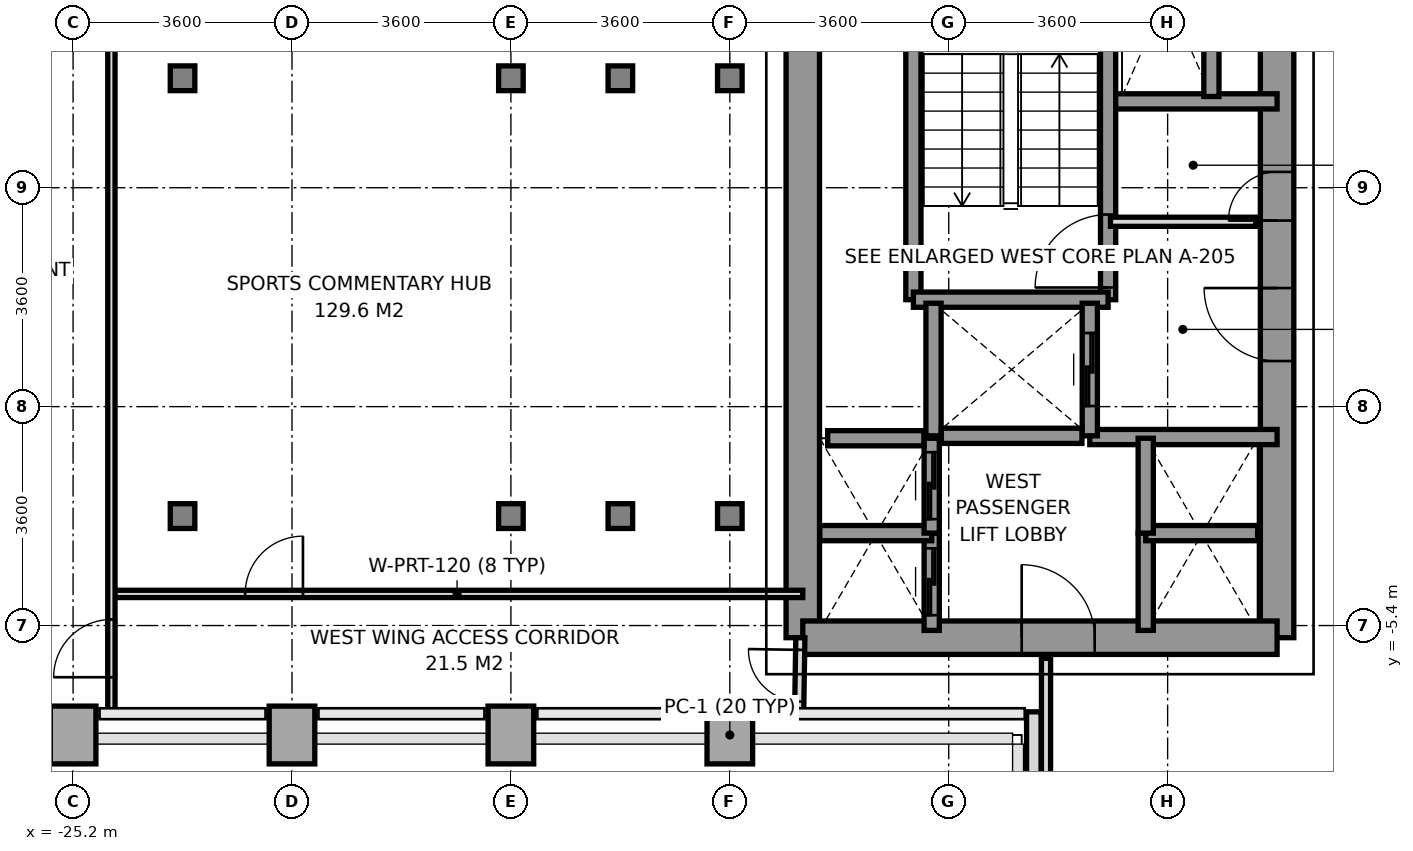
"""IFC4 building model, lengths in metres.
Left out: names, types, materials, properties, quantities, classifications, styles, units other than length and angle.
Written with IfcOpenShell. Run it as: python <this file> out.ifc"""

import sys

from ifc_helpers import new_model, si_unit, direction, frame, frame_2d, origin, origin_2d, place, context, subcontext, project, spatial, rectangle, i_section, extrude, source, transform, mapped, element, fill, save


model = new_model("IFC4")
c1 = context("Model", 3, precision=1e-05, world=origin(), true_north=direction((0.0, 1.0)))
c2 = subcontext(c1, "Body", "Model", "MODEL_VIEW")
j1 = project(units=[si_unit("LENGTHUNIT", "METRE"), si_unit("PLANEANGLEUNIT", "RADIAN")], contexts=[c1])
p1 = place(None, origin())
s1 = spatial("IfcSite", under=j1, at=p1, CompositionType="ELEMENT")
p2 = place(p1, origin())
s2 = spatial("IfcBuilding", under=s1, at=p2, CompositionType="ELEMENT")
p3 = place(p2, frame((0.0, 0.0, 78.2)))
s3 = spatial("IfcBuildingStorey", under=s2, at=p3, CompositionType="ELEMENT", Elevation=78.2)
m1 = source(origin(), c2, "Body", "SweptSolid", [
    extrude(rectangle(XDim=0.75, YDim=0.95, at=origin_2d()), origin(), (0.0, 0.0, 1.0), 3.2),
])
p4 = place(p3, frame((-25.2, -7.2, 0.0), z_axis=(0.0, 0.0, 1.0), x_axis=(1.0, 0.0, 0.0)))
e1 = element("IfcColumn", 1, at=p4, inside=s3, PredefinedType="COLUMN", context=c2, shape_type="MappedRepresentation", body=[
    mapped(m1, transform((0.0, 0.0, 0.0), x_axis=(1.0, 0.0, 0.0), y_axis=(0.0, 1.0, 0.0), z_axis=(0.0, 0.0, 1.0), scale=1.0)),
])
m2 = source(origin(), c2, "Body", "SweptSolid", [
    extrude(i_section(OverallWidth=0.404, OverallDepth=0.407, WebThickness=0.022, FlangeThickness=0.035, at=origin_2d()), origin(), (0.0, 0.0, 1.0), 3.2),
])
for number, where, z_axis, x_axis in (
    (2, (-23.4, -3.6, 0.0), (0.0, 0.0, 1.0), (1.0, 0.0, 0.0)),
    (3, (-23.4, 3.6, 0.0), (0.0, 0.0, 1.0), (1.0, 0.0, 0.0)),
):
    element("IfcColumn", number, at=place(p3, frame(where, z_axis=z_axis, x_axis=x_axis)), inside=s3, PredefinedType="COLUMN", context=c2, shape_type="MappedRepresentation", body=[
        mapped(m2, transform((0.0, 0.0, 0.0), x_axis=(1.0, 0.0, 0.0), y_axis=(0.0, 1.0, 0.0), z_axis=(0.0, 0.0, 1.0), scale=1.0)),
    ])
for number, where, z_axis, x_axis in (
    (4, (-21.6, -7.2, 0.0), (0.0, 0.0, 1.0), (1.0, 0.0, 0.0)),
    (5, (-18.0, -7.2, 0.0), (0.0, 0.0, 1.0), (1.0, 0.0, 0.0)),
):
    element("IfcColumn", number, at=place(p3, frame(where, z_axis=z_axis, x_axis=x_axis)), inside=s3, PredefinedType="COLUMN", context=c2, shape_type="MappedRepresentation", body=[
        mapped(m1, transform((0.0, 0.0, 0.0), x_axis=(1.0, 0.0, 0.0), y_axis=(0.0, 1.0, 0.0), z_axis=(0.0, 0.0, 1.0), scale=1.0)),
    ])
for number, where, z_axis, x_axis in (
    (6, (-18.0, -3.6, 0.0), (0.0, 0.0, 1.0), (1.0, 0.0, 0.0)),
    (7, (-18.0, 3.6, 0.0), (0.0, 0.0, 1.0), (1.0, 0.0, 0.0)),
    (8, (-16.2, -3.6, 0.0), (0.0, 0.0, 1.0), (1.0, 0.0, 0.0)),
    (9, (-16.2, 3.6, 0.0), (0.0, 0.0, 1.0), (1.0, 0.0, 0.0)),
):
    element("IfcColumn", number, at=place(p3, frame(where, z_axis=z_axis, x_axis=x_axis)), inside=s3, PredefinedType="COLUMN", context=c2, shape_type="MappedRepresentation", body=[
        mapped(m2, transform((0.0, 0.0, 0.0), x_axis=(1.0, 0.0, 0.0), y_axis=(0.0, 1.0, 0.0), z_axis=(0.0, 0.0, 1.0), scale=1.0)),
    ])
p5 = place(p3, frame((-14.4, -7.2, 0.0), z_axis=(0.0, 0.0, 1.0), x_axis=(1.0, 0.0, 0.0)))
e10 = element("IfcColumn", 10, at=p5, inside=s3, PredefinedType="COLUMN", context=c2, shape_type="MappedRepresentation", body=[
    mapped(m1, transform((0.0, 0.0, 0.0), x_axis=(1.0, 0.0, 0.0), y_axis=(0.0, 1.0, 0.0), z_axis=(0.0, 0.0, 1.0), scale=1.0)),
])
for number, where, z_axis, x_axis in (
    (11, (-14.4, -3.6, 0.0), (0.0, 0.0, 1.0), (1.0, 0.0, 0.0)),
    (12, (-14.4, 3.6, 0.0), (0.0, 0.0, 1.0), (1.0, 0.0, 0.0)),
):
    element("IfcColumn", number, at=place(p3, frame(where, z_axis=z_axis, x_axis=x_axis)), inside=s3, PredefinedType="COLUMN", context=c2, shape_type="MappedRepresentation", body=[
        mapped(m2, transform((0.0, 0.0, 0.0), x_axis=(1.0, 0.0, 0.0), y_axis=(0.0, 1.0, 0.0), z_axis=(0.0, 0.0, 1.0), scale=1.0)),
    ])
p6 = place(p3, frame((-9.4, -8.397, 0.0), z_axis=(0.0, 0.0, 1.0), x_axis=(0.0, 1.0, 0.0)))
e13 = element("IfcWall", 13, at=p6, inside=s3, PredefinedType="PARAPET", context=c2, shape_type="SweptSolid", body=[
    extrude(rectangle(XDim=1.578, YDim=0.24, at=frame_2d((0.789, 0.0))), origin(), (0.0, 0.0, 1.0), 1.15),
])
p7 = place(p3, frame((-13.2, -5.6, 0.0), z_axis=(0.0, 0.0, 1.0), x_axis=(0.0, 1.0, 0.0)))
e14 = element("IfcWall", 14, at=p7, inside=s3, PredefinedType="SHEAR", context=c2, shape_type="SweptSolid", body=[
    extrude(rectangle(XDim=11.2, YDim=0.55, at=frame_2d((5.6, 0.0))), origin(), (0.0, 0.0, 1.0), 3.2),
])
p8 = place(p3, frame((-5.4, -5.6, 0.0), z_axis=(0.0, 0.0, 1.0), x_axis=(0.0, 1.0, 0.0)))
e15 = element("IfcWall", 15, at=p8, inside=s3, PredefinedType="SHEAR", context=c2, shape_type="SweptSolid", body=[
    extrude(rectangle(XDim=12.5, YDim=0.55, at=frame_2d((6.25, 0.0))), origin(), (0.0, 0.0, 1.0), 3.2),
])
p9 = place(p8, frame((4.55, 0.0, 0.0)))
e16 = element("IfcOpeningElement", 16, at=p9, cuts=e15, PredefinedType="OPENING", context=c2, shape_type="SweptSolid", body=[
    extrude(rectangle(XDim=1.2, YDim=2.2, at=frame_2d((0.6, 1.1))), frame((0.0, 0.285, 0.0), z_axis=(0.0, -1.0, 0.0), x_axis=(1.0, 0.0, 0.0)), (0.0, 0.0, 1.0), 0.57),
])
p10 = place(p8, frame((6.86, 0.0, 0.0)))
e17 = element("IfcOpeningElement", 17, at=p10, cuts=e15, PredefinedType="OPENING", context=c2, shape_type="SweptSolid", body=[
    extrude(rectangle(XDim=0.8, YDim=2.1, at=frame_2d((0.4, 1.05))), frame((0.0, 0.285, 0.0), z_axis=(0.0, -1.0, 0.0), x_axis=(1.0, 0.0, 0.0)), (0.0, 0.0, 1.0), 0.57),
])
p11 = place(p3, frame((-13.2, -5.6, 0.0), z_axis=(0.0, 0.0, 1.0), x_axis=(1.0, 0.0, 0.0)))
e18 = element("IfcWall", 18, at=p11, inside=s3, PredefinedType="SHEAR", context=c2, shape_type="SweptSolid", body=[
    extrude(rectangle(XDim=7.8, YDim=0.55, at=frame_2d((3.9, 0.0))), origin(), (0.0, 0.0, 1.0), 3.2),
])
p12 = place(p11, frame((3.6, 0.0, 0.0)))
e19 = element("IfcOpeningElement", 19, at=p12, cuts=e18, PredefinedType="OPENING", context=c2, shape_type="SweptSolid", body=[
    extrude(rectangle(XDim=1.2, YDim=2.2, at=frame_2d((0.6, 1.1))), frame((0.0, 0.285, 0.0), z_axis=(0.0, -1.0, 0.0), x_axis=(1.0, 0.0, 0.0)), (0.0, 0.0, 1.0), 0.57),
])
p13 = place(p3, frame((-8.18, 3.22, 0.0), z_axis=(0.0, 0.0, 1.0), x_axis=(1.0, 0.0, 0.0)))
e20 = element("IfcWall", 20, at=p13, inside=s3, PredefinedType="SOLIDWALL", context=c2, shape_type="SweptSolid", body=[
    extrude(rectangle(XDim=2.78, YDim=0.25, at=frame_2d((1.39, 0.0))), origin(), (0.0, 0.0, 1.0), 3.2),
])
p14 = place(p3, frame((-8.48, -2.3, 0.0), z_axis=(0.0, 0.0, 1.0), x_axis=(1.0, 0.0, 0.0)))
e21 = element("IfcWall", 21, at=p14, inside=s3, PredefinedType="SOLIDWALL", context=c2, shape_type="SweptSolid", body=[
    extrude(rectangle(XDim=3.08, YDim=0.25, at=frame_2d((1.54, 0.0))), origin(), (0.0, 0.0, 1.0), 3.2),
])
p15 = place(p3, frame((-8.179, -0.041, 0.0), z_axis=(0.0, 0.0, 1.0), x_axis=(0.0, 1.0, 0.0)))
e22 = element("IfcWall", 22, at=p15, inside=s3, PredefinedType="SOLIDWALL", context=c2, shape_type="SweptSolid", body=[
    extrude(rectangle(XDim=6.941, YDim=0.25, at=frame_2d((3.47, 0.0))), origin(), (0.0, 0.0, 1.0), 3.2),
])
p16 = place(p15, frame((0.2, 0.0, 0.0)))
e23 = element("IfcOpeningElement", 23, at=p16, cuts=e22, PredefinedType="OPENING", context=c2, shape_type="SweptSolid", body=[
    extrude(rectangle(XDim=1.2, YDim=2.2, at=frame_2d((0.6, 1.1))), frame((0.0, 0.135, 0.0), z_axis=(0.0, -1.0, 0.0), x_axis=(1.0, 0.0, 0.0)), (0.0, 0.0, 1.0), 0.27),
])
p17 = place(p3, frame((-11.381, -0.041, 0.0), z_axis=(0.0, 0.0, 1.0), x_axis=(0.0, 1.0, 0.0)))
e24 = element("IfcWall", 24, at=p17, inside=s3, PredefinedType="SOLIDWALL", context=c2, shape_type="SweptSolid", body=[
    extrude(rectangle(XDim=6.941, YDim=0.25, at=frame_2d((3.47, 0.0))), origin(), (0.0, 0.0, 1.0), 3.2),
])
p18 = place(p3, frame((-11.381, -0.041, 0.0), z_axis=(0.0, 0.0, 1.0), x_axis=(1.0, 0.0, 0.0)))
e25 = element("IfcWall", 25, at=p18, inside=s3, PredefinedType="SOLIDWALL", context=c2, shape_type="SweptSolid", body=[
    extrude(rectangle(XDim=3.202, YDim=0.25, at=frame_2d((1.601, 0.0))), origin(), (0.0, 0.0, 1.0), 3.2),
])
p19 = place(p3, frame((-11.05, -2.28, 0.0), z_axis=(0.0, 0.0, 1.0), x_axis=(0.0, 1.0, 0.0)))
e26 = element("IfcWall", 26, at=p19, inside=s3, PredefinedType="SOLIDWALL", context=c2, shape_type="SweptSolid", body=[
    extrude(rectangle(XDim=2.18, YDim=0.25, at=frame_2d((1.09, 0.0))), origin(), (0.0, 0.0, 1.0), 3.2),
])
p20 = place(p3, frame((-8.48, -2.28, 0.0), z_axis=(0.0, 0.0, 1.0), x_axis=(0.0, 1.0, 0.0)))
e27 = element("IfcWall", 27, at=p20, inside=s3, PredefinedType="SOLIDWALL", context=c2, shape_type="SweptSolid", body=[
    extrude(rectangle(XDim=2.18, YDim=0.25, at=frame_2d((1.09, 0.0))), origin(), (0.0, 0.0, 1.0), 3.2),
])
p21 = place(p20, frame((0.49, 0.0, 0.0)))
e28 = element("IfcOpeningElement", 28, at=p21, cuts=e27, PredefinedType="OPENING", context=c2, shape_type="SweptSolid", body=[
    extrude(rectangle(XDim=1.2, YDim=2.2, at=frame_2d((0.6, 1.1))), frame((0.0, 0.135, 0.0), z_axis=(0.0, -1.0, 0.0), x_axis=(1.0, 0.0, 0.0)), (0.0, 0.0, 1.0), 0.27),
])
p22 = place(p3, frame((-10.921, -2.28, 0.0), z_axis=(0.0, 0.0, 1.0), x_axis=(1.0, 0.0, 0.0)))
e29 = element("IfcWall", 29, at=p22, inside=s3, PredefinedType="SOLIDWALL", context=c2, shape_type="SweptSolid", body=[
    extrude(rectangle(XDim=2.312, YDim=0.25, at=frame_2d((1.156, 0.0))), origin(), (0.0, 0.0, 1.0), 3.2),
])
p23 = place(p3, frame((-11.08, -5.48, 0.0), z_axis=(0.0, 0.0, 1.0), x_axis=(0.0, 1.0, 0.0)))
e30 = element("IfcWall", 30, at=p23, inside=s3, PredefinedType="SOLIDWALL", context=c2, shape_type="SweptSolid", body=[
    extrude(rectangle(XDim=1.6, YDim=0.25, at=frame_2d((0.8, 0.0))), origin(), (0.0, 0.0, 1.0), 3.2),
])
p24 = place(p23, frame((0.25, 0.0, 0.0)))
e31 = element("IfcOpeningElement", 31, at=p24, cuts=e30, PredefinedType="OPENING", context=c2, shape_type="SweptSolid", body=[
    extrude(rectangle(XDim=1.1, YDim=2.2, at=frame_2d((0.55, 1.1))), frame((0.0, 0.135, 0.0), z_axis=(0.0, -1.0, 0.0), x_axis=(1.0, 0.0, 0.0)), (0.0, 0.0, 1.0), 0.27),
])
p25 = place(p3, frame((-12.92, -3.88, 0.0), z_axis=(0.0, 0.0, 1.0), x_axis=(1.0, 0.0, 0.0)))
e32 = element("IfcWall", 32, at=p25, inside=s3, PredefinedType="SOLIDWALL", context=c2, shape_type="SweptSolid", body=[
    extrude(rectangle(XDim=1.84, YDim=0.25, at=frame_2d((0.92, 0.0))), origin(), (0.0, 0.0, 1.0), 3.2),
])
p26 = place(p3, frame((-11.08, -3.88, 0.0), z_axis=(0.0, 0.0, 1.0), x_axis=(0.0, 1.0, 0.0)))
e33 = element("IfcWall", 33, at=p26, inside=s3, PredefinedType="SOLIDWALL", context=c2, shape_type="SweptSolid", body=[
    extrude(rectangle(XDim=1.56, YDim=0.25, at=frame_2d((0.78, 0.0))), origin(), (0.0, 0.0, 1.0), 3.2),
])
p27 = place(p26, frame((0.23, 0.0, 0.0)))
e34 = element("IfcOpeningElement", 34, at=p27, cuts=e33, PredefinedType="OPENING", context=c2, shape_type="SweptSolid", body=[
    extrude(rectangle(XDim=1.1, YDim=2.2, at=frame_2d((0.55, 1.1))), frame((0.0, 0.135, 0.0), z_axis=(0.0, -1.0, 0.0), x_axis=(1.0, 0.0, 0.0)), (0.0, 0.0, 1.0), 0.27),
])
p28 = place(p3, frame((-12.791, -2.32, 0.0), z_axis=(0.0, 0.0, 1.0), x_axis=(1.0, 0.0, 0.0)))
e35 = element("IfcWall", 35, at=p28, inside=s3, PredefinedType="SOLIDWALL", context=c2, shape_type="SweptSolid", body=[
    extrude(rectangle(XDim=1.582, YDim=0.25, at=frame_2d((0.791, 0.0))), origin(), (0.0, 0.0, 1.0), 3.2),
])
p29 = place(p3, frame((-7.56, -5.48, 0.0), z_axis=(0.0, 0.0, 1.0), x_axis=(0.0, 1.0, 0.0)))
e36 = element("IfcWall", 36, at=p29, inside=s3, PredefinedType="SOLIDWALL", context=c2, shape_type="SweptSolid", body=[
    extrude(rectangle(XDim=1.6, YDim=0.25, at=frame_2d((0.8, 0.0))), origin(), (0.0, 0.0, 1.0), 3.2),
])
p30 = place(p3, frame((-7.56, -3.88, 0.0), z_axis=(0.0, 0.0, 1.0), x_axis=(1.0, 0.0, 0.0)))
e37 = element("IfcWall", 37, at=p30, inside=s3, PredefinedType="SOLIDWALL", context=c2, shape_type="SweptSolid", body=[
    extrude(rectangle(XDim=1.84, YDim=0.25, at=frame_2d((0.92, 0.0))), origin(), (0.0, 0.0, 1.0), 3.2),
])
p31 = place(p3, frame((-7.56, -3.88, 0.0), z_axis=(0.0, 0.0, 1.0), x_axis=(0.0, 1.0, 0.0)))
e38 = element("IfcWall", 38, at=p31, inside=s3, PredefinedType="SOLIDWALL", context=c2, shape_type="SweptSolid", body=[
    extrude(rectangle(XDim=1.56, YDim=0.25, at=frame_2d((0.78, 0.0))), origin(), (0.0, 0.0, 1.0), 3.2),
])
p32 = place(p3, frame((-6.48, 3.3, 0.0), z_axis=(0.0, 0.0, 1.0), x_axis=(0.0, 1.0, 0.0)))
e39 = element("IfcWall", 39, at=p32, inside=s3, PredefinedType="SOLIDWALL", context=c2, shape_type="SweptSolid", body=[
    extrude(rectangle(XDim=1.68, YDim=0.25, at=frame_2d((0.84, 0.0))), origin(), (0.0, 0.0, 1.0), 3.2),
])
p33 = place(p3, frame((-8.14, 1.24, 0.0), z_axis=(0.0, 0.0, 1.0), x_axis=(1.0, 0.0, 0.0)))
e40 = element("IfcWall", 40, at=p33, inside=s3, PredefinedType="PARTITIONING", context=c2, shape_type="SweptSolid", body=[
    extrude(rectangle(XDim=2.39, YDim=0.15, at=frame_2d((1.195, 0.0))), origin(), (0.0, 0.0, 1.0), 2.3),
])
p34 = place(p3, frame((-9.2, -15.68, 0.0), z_axis=(0.0, 0.0, 1.0), x_axis=(0.0, 1.0, 0.0)))
e41 = element("IfcWall", 41, at=p34, inside=s3, PredefinedType="PARTITIONING", context=c2, shape_type="SweptSolid", body=[
    extrude(rectangle(XDim=9.74, YDim=0.15, at=frame_2d((4.87, 0.0))), origin(), (0.0, 0.0, 1.0), 2.65),
])
p35 = place(p3, frame((-13.26, -6.85, 0.0), z_axis=(0.0, 0.0, 1.0), x_axis=(0.016013571389, 0.999871774545, 0.0)))
e42 = element("IfcWall", 42, at=p35, inside=s3, PredefinedType="PARTITIONING", context=c2, shape_type="SweptSolid", body=[
    extrude(rectangle(XDim=1.25, YDim=0.15, at=frame_2d((0.625, 0.0))), origin(), (0.0, 0.0, 1.0), 3.2),
])
p36 = place(p35, frame((0.2, 0.0, 0.0)))
e43 = element("IfcOpeningElement", 43, at=p36, cuts=e42, PredefinedType="OPENING", context=c2, shape_type="SweptSolid", body=[
    extrude(rectangle(XDim=0.85, YDim=2.1, at=frame_2d((0.425, 1.05))), frame((0.0, 0.085, 0.0), z_axis=(0.0, -1.0, 0.0), x_axis=(1.0, 0.0, 0.0)), (0.0, 0.0, 1.0), 0.17),
])
p37 = place(p3, frame((-24.57, -4.88, 0.0), z_axis=(0.0, 0.0, 1.0), x_axis=(1.0, 0.0, 0.0)))
e44 = element("IfcWall", 44, at=p37, inside=s3, PredefinedType="PARTITIONING", context=c2, shape_type="SweptSolid", body=[
    extrude(rectangle(XDim=11.37, YDim=0.12, at=frame_2d((5.685, 0.0))), origin(), (0.0, 0.0, 1.0), 2.7),
])
p38 = place(p37, frame((2.2, 0.0, 0.0)))
e45 = element("IfcOpeningElement", 45, at=p38, cuts=e44, PredefinedType="OPENING", context=c2, shape_type="SweptSolid", body=[
    extrude(rectangle(XDim=0.95, YDim=2.15, at=frame_2d((0.475, 1.075))), frame((0.0, 0.07, 0.0), z_axis=(0.0, -1.0, 0.0), x_axis=(1.0, 0.0, 0.0)), (0.0, 0.0, 1.0), 0.14),
])
p39 = place(p3, frame((-24.57, -6.85, 0.0), z_axis=(0.0, 0.0, 1.0), x_axis=(0.0, 1.0, 0.0)))
e46 = element("IfcWall", 46, at=p39, inside=s3, PredefinedType="PARTITIONING", context=c2, shape_type="SweptSolid", body=[
    extrude(rectangle(XDim=13.7, YDim=0.12, at=frame_2d((6.85, 0.0))), origin(), (0.0, 0.0, 1.0), 2.65),
])
p40 = place(p39, frame((0.6, 0.0, 0.0)))
e47 = element("IfcOpeningElement", 47, at=p40, cuts=e46, PredefinedType="OPENING", context=c2, shape_type="SweptSolid", body=[
    extrude(rectangle(XDim=0.95, YDim=2.15, at=frame_2d((0.475, 1.075))), frame((0.0, 0.07, 0.0), z_axis=(0.0, -1.0, 0.0), x_axis=(1.0, 0.0, 0.0)), (0.0, 0.0, 1.0), 0.14),
])
m3 = source(origin(), c2, "Body", "SweptSolid", [
    extrude(rectangle(XDim=1.2, YDim=2.2, at=frame_2d((0.6, 1.1))), frame((0.0, 0.025, 0.0), z_axis=(0.0, -1.0, 0.0), x_axis=(1.0, 0.0, 0.0)), (0.0, 0.0, 1.0), 0.05),
])
p41 = place(p16, origin())
e48 = element("IfcDoor", 48, at=p41, inside=s3, OperationType="SINGLE_SWING_LEFT", PredefinedType="DOOR", context=c2, shape_type="MappedRepresentation", body=[
    mapped(m3, transform((0.0, 0.0, 0.0), x_axis=(1.0, 0.0, 0.0), y_axis=(0.0, 1.0, 0.0), z_axis=(0.0, 0.0, 1.0), scale=1.0)),
])
fill(e23, e48)
p42 = place(p9, origin())
e49 = element("IfcDoor", 49, at=p42, inside=s3, OperationType="SINGLE_SWING_RIGHT", PredefinedType="DOOR", context=c2, shape_type="MappedRepresentation", body=[
    mapped(m3, transform((0.0, 0.0, 0.0), x_axis=(1.0, 0.0, 0.0), y_axis=(0.0, 1.0, 0.0), z_axis=(0.0, 0.0, 1.0), scale=1.0)),
])
fill(e16, e49)
p43 = place(p12, origin())
e50 = element("IfcDoor", 50, at=p43, inside=s3, OperationType="SINGLE_SWING_LEFT", PredefinedType="DOOR", context=c2, shape_type="MappedRepresentation", body=[
    mapped(m3, transform((0.0, 0.0, 0.0), x_axis=(1.0, 0.0, 0.0), y_axis=(0.0, 1.0, 0.0), z_axis=(0.0, 0.0, 1.0), scale=1.0)),
])
fill(e19, e50)
m4 = source(origin(), c2, "Body", "SweptSolid", [
    extrude(rectangle(XDim=0.8, YDim=2.1, at=frame_2d((0.4, 1.05))), frame((0.0, 0.025, 0.0), z_axis=(0.0, -1.0, 0.0), x_axis=(1.0, 0.0, 0.0)), (0.0, 0.0, 1.0), 0.05),
])
p44 = place(p10, origin())
e51 = element("IfcDoor", 51, at=p44, inside=s3, OperationType="SINGLE_SWING_LEFT", PredefinedType="DOOR", context=c2, shape_type="MappedRepresentation", body=[
    mapped(m4, transform((0.0, 0.0, 0.0), x_axis=(1.0, 0.0, 0.0), y_axis=(0.0, 1.0, 0.0), z_axis=(0.0, 0.0, 1.0), scale=1.0)),
])
fill(e17, e51)
p45 = place(p21, origin())
e52 = element("IfcDoor", 52, at=p45, inside=s3, OperationType="SLIDING_TO_RIGHT", PredefinedType="DOOR", context=c2, shape_type="MappedRepresentation", body=[
    mapped(m3, transform((0.0, 0.0, 0.0), x_axis=(1.0, 0.0, 0.0), y_axis=(0.0, 1.0, 0.0), z_axis=(0.0, 0.0, 1.0), scale=1.0)),
])
fill(e28, e52)
m5 = source(origin(), c2, "Body", "SweptSolid", [
    extrude(rectangle(XDim=1.1, YDim=2.2, at=frame_2d((0.55, 1.1))), frame((0.0, 0.025, 0.0), z_axis=(0.0, -1.0, 0.0), x_axis=(1.0, 0.0, 0.0)), (0.0, 0.0, 1.0), 0.05),
])
p46 = place(p24, origin())
e53 = element("IfcDoor", 53, at=p46, inside=s3, OperationType="SLIDING_TO_LEFT", PredefinedType="DOOR", context=c2, shape_type="MappedRepresentation", body=[
    mapped(m5, transform((0.0, 0.0, 0.0), x_axis=(1.0, 0.0, 0.0), y_axis=(0.0, 1.0, 0.0), z_axis=(0.0, 0.0, 1.0), scale=1.0)),
])
fill(e31, e53)
p47 = place(p27, origin())
e54 = element("IfcDoor", 54, at=p47, inside=s3, OperationType="SLIDING_TO_LEFT", PredefinedType="DOOR", context=c2, shape_type="MappedRepresentation", body=[
    mapped(m5, transform((0.0, 0.0, 0.0), x_axis=(1.0, 0.0, 0.0), y_axis=(0.0, 1.0, 0.0), z_axis=(0.0, 0.0, 1.0), scale=1.0)),
])
fill(e34, e54)
m6 = source(origin(), c2, "Body", "SweptSolid", [
    extrude(rectangle(XDim=0.95, YDim=2.15, at=frame_2d((0.475, 1.075))), frame((0.0, 0.025, 0.0), z_axis=(0.0, -1.0, 0.0), x_axis=(1.0, 0.0, 0.0)), (0.0, 0.0, 1.0), 0.05),
])
p48 = place(p38, origin())
e55 = element("IfcDoor", 55, at=p48, inside=s3, OperationType="SINGLE_SWING_RIGHT", PredefinedType="DOOR", context=c2, shape_type="MappedRepresentation", body=[
    mapped(m6, transform((0.0, 0.0, 0.0), x_axis=(1.0, 0.0, 0.0), y_axis=(0.0, 1.0, 0.0), z_axis=(0.0, 0.0, 1.0), scale=1.0)),
])
fill(e45, e55)
p49 = place(p40, origin())
e56 = element("IfcDoor", 56, at=p49, inside=s3, OperationType="SINGLE_SWING_LEFT", PredefinedType="DOOR", context=c2, shape_type="MappedRepresentation", body=[
    mapped(m6, transform((0.0, 0.0, 0.0), x_axis=(1.0, 0.0, 0.0), y_axis=(0.0, 1.0, 0.0), z_axis=(0.0, 0.0, 1.0), scale=1.0)),
])
fill(e47, e56)
m7 = source(origin(), c2, "Body", "SweptSolid", [
    extrude(rectangle(XDim=0.85, YDim=2.1, at=frame_2d((0.425, 1.05))), frame((0.0, 0.025, 0.0), z_axis=(0.0, -1.0, 0.0), x_axis=(1.0, 0.0, 0.0)), (0.0, 0.0, 1.0), 0.05),
])
p50 = place(p36, origin())
e57 = element("IfcDoor", 57, at=p50, inside=s3, OperationType="SINGLE_SWING_RIGHT", PredefinedType="DOOR", context=c2, shape_type="MappedRepresentation", body=[
    mapped(m7, transform((0.0, 0.0, 0.0), x_axis=(1.0, 0.0, 0.0), y_axis=(0.0, 1.0, 0.0), z_axis=(0.0, 0.0, 1.0), scale=1.0)),
])
fill(e43, e57)
save(model, sys.argv[1])
